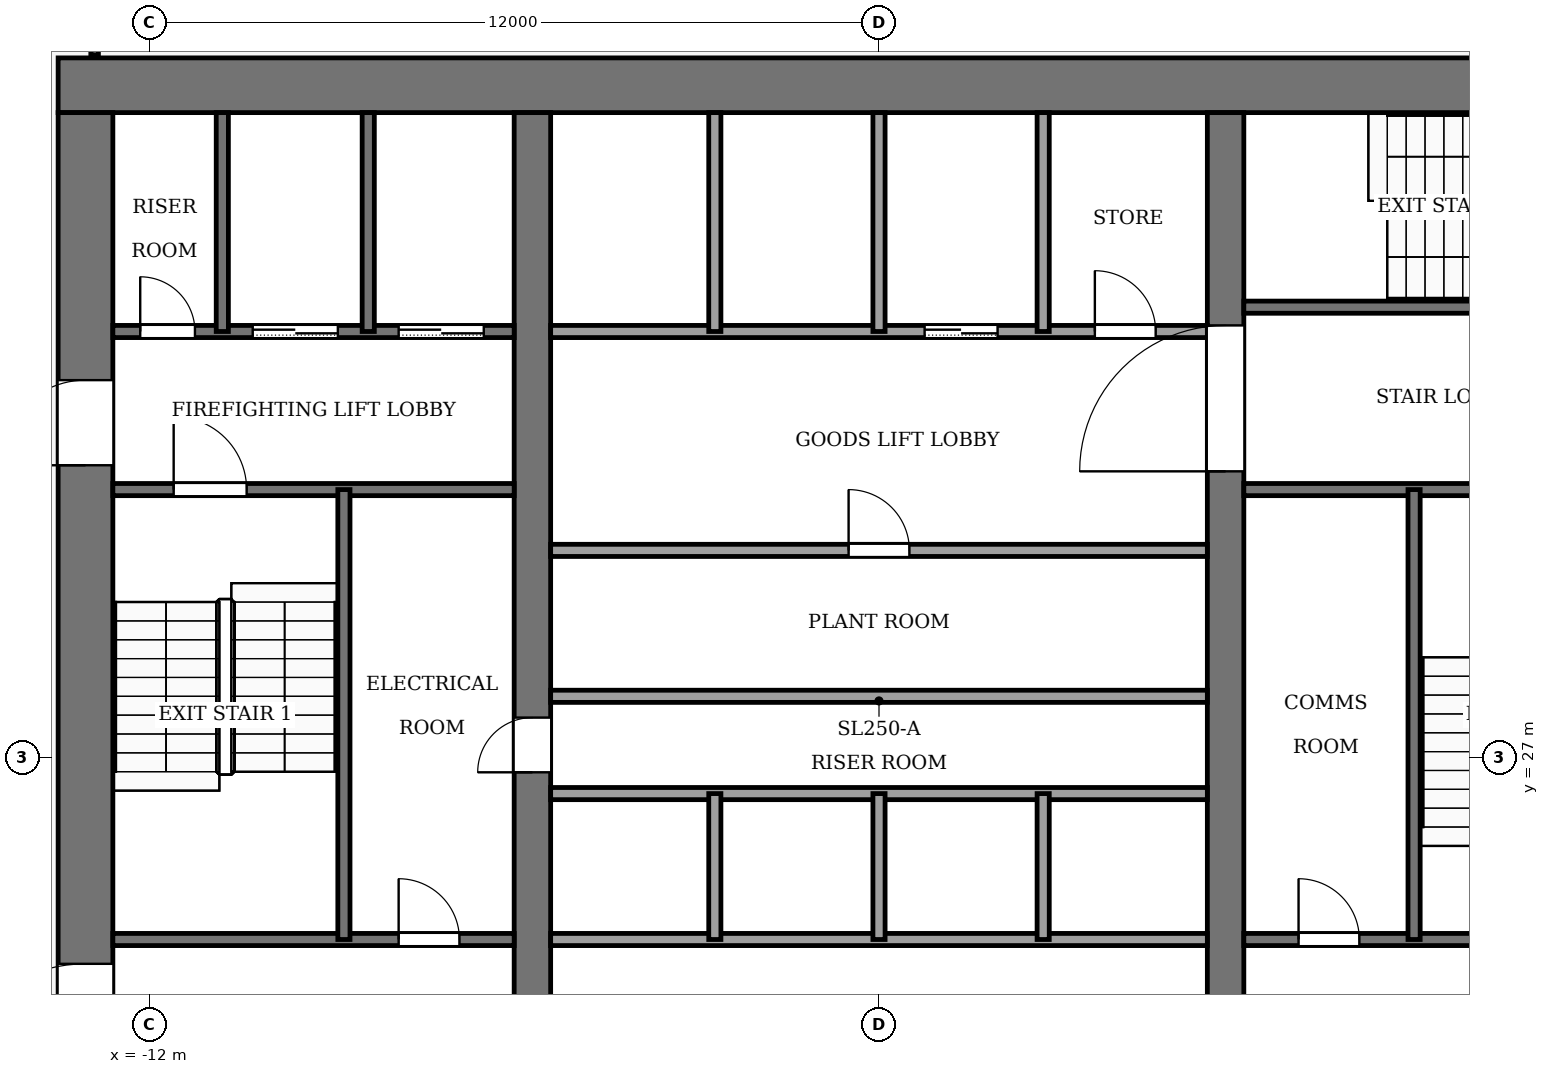
"""IFC4 building model, lengths in metres.
Left out: names, types, materials, properties, quantities, classifications, styles, units other than length and angle.
Written with IfcOpenShell. Run it as: python <this file> out.ifc"""

import sys

from ifc_helpers import new_model, si_unit, direction, frame, frame_2d, origin, place, context, subcontext, project, spatial, rectangle, extrude, element, fill, save


model = new_model("IFC4")
c1 = context("Model", 3, precision=1e-05, world=origin(), true_north=direction((0.0, 1.0)))
c2 = subcontext(c1, "Body", "Model", "MODEL_VIEW")
j1 = project(units=[si_unit("LENGTHUNIT", "METRE"), si_unit("PLANEANGLEUNIT", "RADIAN")], contexts=[c1])
p1 = place(None, origin())
s1 = spatial("IfcSite", under=j1, at=p1, CompositionType="ELEMENT")
p2 = place(p1, origin())
s2 = spatial("IfcBuilding", under=s1, at=p2, CompositionType="ELEMENT")
p3 = place(p2, frame((0.0, 0.0, 226.0)))
s3 = spatial("IfcBuildingStorey", under=s2, at=p3, CompositionType="ELEMENT", Elevation=226.0)
p4 = place(p3, frame((-13.5, 38.05, -0.25), z_axis=(0.0, 0.0, 1.0), x_axis=(1.0, 0.0, 0.0)))
e1 = element("IfcWall", 1, at=p4, inside=s3, PredefinedType="SHEAR", context=c2, shape_type="SweptSolid", body=[
    extrude(rectangle(XDim=27.0, YDim=0.9, at=frame_2d((13.5, 0.0))), origin(), (0.0, 0.0, 1.0), 7.12),
])
p5 = place(p3, frame((-13.05, 18.4, -0.25), z_axis=(0.0, 0.0, 1.0), x_axis=(0.0, 1.0, 0.0)))
e2 = element("IfcWall", 2, at=p5, inside=s3, PredefinedType="SHEAR", context=c2, shape_type="SweptSolid", body=[
    extrude(rectangle(XDim=19.2, YDim=0.9, at=frame_2d((9.6, 0.0))), origin(), (0.0, 0.0, 1.0), 7.12),
])
p6 = place(p5, frame((2.8, 0.0, 0.25)))
e3 = element("IfcOpeningElement", 3, at=p6, cuts=e2, PredefinedType="OPENING", context=c2, shape_type="SweptSolid", body=[
    extrude(rectangle(XDim=2.4, YDim=2.4, at=frame_2d((1.2, 1.2))), frame((0.0, 0.46, 0.0), z_axis=(0.0, -1.0, 0.0), x_axis=(1.0, 0.0, 0.0)), (0.0, 0.0, 1.0), 0.92),
])
p7 = place(p5, frame((13.4, 0.0, 0.25)))
e4 = element("IfcOpeningElement", 4, at=p7, cuts=e2, PredefinedType="OPENING", context=c2, shape_type="SweptSolid", body=[
    extrude(rectangle(XDim=1.4, YDim=2.2, at=frame_2d((0.7, 1.1))), frame((0.0, 0.46, 0.0), z_axis=(0.0, -1.0, 0.0), x_axis=(1.0, 0.0, 0.0)), (0.0, 0.0, 1.0), 0.92),
])
p8 = place(p3, frame((-5.7, 18.4, -0.25), z_axis=(0.0, 0.0, 1.0), x_axis=(0.0, 1.0, 0.0)))
e5 = element("IfcWall", 5, at=p8, inside=s3, PredefinedType="SHEAR", context=c2, shape_type="SweptSolid", body=[
    extrude(rectangle(XDim=19.2, YDim=0.6, at=frame_2d((9.6, 0.0))), origin(), (0.0, 0.0, 1.0), 7.12),
])
p9 = place(p8, frame((8.35, 0.0, 0.25)))
e6 = element("IfcOpeningElement", 6, at=p9, cuts=e5, PredefinedType="OPENING", context=c2, shape_type="SweptSolid", body=[
    extrude(rectangle(XDim=0.9, YDim=2.1, at=frame_2d((0.45, 1.05))), frame((0.0, 0.31, 0.0), z_axis=(0.0, -1.0, 0.0), x_axis=(1.0, 0.0, 0.0)), (0.0, 0.0, 1.0), 0.62),
])
p10 = place(p3, frame((5.7, 18.4, -0.25), z_axis=(0.0, 0.0, 1.0), x_axis=(0.0, 1.0, 0.0)))
e7 = element("IfcWall", 7, at=p10, inside=s3, PredefinedType="SHEAR", context=c2, shape_type="SweptSolid", body=[
    extrude(rectangle(XDim=19.2, YDim=0.6, at=frame_2d((9.6, 0.0))), origin(), (0.0, 0.0, 1.0), 7.12),
])
p11 = place(p10, frame((13.3, 0.0, 0.25)))
e8 = element("IfcOpeningElement", 8, at=p11, cuts=e7, PredefinedType="OPENING", context=c2, shape_type="SweptSolid", body=[
    extrude(rectangle(XDim=2.4, YDim=2.4, at=frame_2d((1.2, 1.2))), frame((0.0, 0.31, 0.0), z_axis=(0.0, -1.0, 0.0), x_axis=(1.0, 0.0, 0.0)), (0.0, 0.0, 1.0), 0.62),
])
p12 = place(p3, frame((-12.6, 24.0, 0.0), z_axis=(0.0, 0.0, 1.0), x_axis=(1.0, 0.0, 0.0)))
e9 = element("IfcWall", 9, at=p12, inside=s3, PredefinedType="PARTITIONING", context=c2, shape_type="SweptSolid", body=[
    extrude(rectangle(XDim=6.6, YDim=0.2, at=frame_2d((3.3, 0.0))), origin(), (0.0, 0.0, 1.0), 6.87),
])
p13 = place(p12, frame((4.7, 0.0, 0.0)))
e10 = element("IfcOpeningElement", 10, at=p13, cuts=e9, PredefinedType="OPENING", context=c2, shape_type="SweptSolid", body=[
    extrude(rectangle(XDim=1.0, YDim=2.1, at=frame_2d((0.5, 1.05))), frame((0.0, 0.11, 0.0), z_axis=(0.0, -1.0, 0.0), x_axis=(1.0, 0.0, 0.0)), (0.0, 0.0, 1.0), 0.22),
])
p14 = place(p3, frame((-5.4, 24.0, 0.0), z_axis=(0.0, 0.0, 1.0), x_axis=(1.0, 0.0, 0.0)))
e11 = element("IfcWall", 11, at=p14, inside=s3, PredefinedType="PARTITIONING", context=c2, shape_type="SweptSolid", body=[
    extrude(rectangle(XDim=10.8, YDim=0.2, at=frame_2d((5.4, 0.0))), origin(), (0.0, 0.0, 1.0), 6.87),
])
p15 = place(p3, frame((6.0, 24.0, 0.0), z_axis=(0.0, 0.0, 1.0), x_axis=(1.0, 0.0, 0.0)))
e12 = element("IfcWall", 12, at=p15, inside=s3, PredefinedType="PARTITIONING", context=c2, shape_type="SweptSolid", body=[
    extrude(rectangle(XDim=6.6, YDim=0.2, at=frame_2d((3.3, 0.0))), origin(), (0.0, 0.0, 1.0), 6.87),
])
p16 = place(p15, frame((0.9, 0.0, 0.0)))
e13 = element("IfcOpeningElement", 13, at=p16, cuts=e12, PredefinedType="OPENING", context=c2, shape_type="SweptSolid", body=[
    extrude(rectangle(XDim=1.0, YDim=2.1, at=frame_2d((0.5, 1.05))), frame((0.0, 0.11, 0.0), z_axis=(0.0, -1.0, 0.0), x_axis=(1.0, 0.0, 0.0)), (0.0, 0.0, 1.0), 0.22),
])
p17 = place(p15, frame((4.4, 0.0, 0.0)))
e14 = element("IfcOpeningElement", 14, at=p17, cuts=e12, PredefinedType="OPENING", context=c2, shape_type="SweptSolid", body=[
    extrude(rectangle(XDim=1.2, YDim=2.2, at=frame_2d((0.6, 1.1))), frame((0.0, 0.11, 0.0), z_axis=(0.0, -1.0, 0.0), x_axis=(1.0, 0.0, 0.0)), (0.0, 0.0, 1.0), 0.22),
])
for number, where, z_axis, x_axis in (
    (15, (-5.4, 26.4, 0.0), (0.0, 0.0, 1.0), (1.0, 0.0, 0.0)),
    (16, (-5.4, 28.0, 0.0), (0.0, 0.0, 1.0), (1.0, 0.0, 0.0)),
):
    element("IfcWall", number, at=place(p3, frame(where, z_axis=z_axis, x_axis=x_axis)), inside=s3, PredefinedType="PARTITIONING", context=c2, shape_type="SweptSolid", body=[
        extrude(rectangle(XDim=10.8, YDim=0.2, at=frame_2d((5.4, 0.0))), origin(), (0.0, 0.0, 1.0), 6.87),
    ])
p18 = place(p3, frame((-5.4, 30.4, 0.0), z_axis=(0.0, 0.0, 1.0), x_axis=(1.0, 0.0, 0.0)))
e17 = element("IfcWall", 17, at=p18, inside=s3, PredefinedType="PARTITIONING", context=c2, shape_type="SweptSolid", body=[
    extrude(rectangle(XDim=10.8, YDim=0.2, at=frame_2d((5.4, 0.0))), origin(), (0.0, 0.0, 1.0), 6.87),
])
p19 = place(p18, frame((4.9, 0.0, 0.0)))
e18 = element("IfcOpeningElement", 18, at=p19, cuts=e17, PredefinedType="OPENING", context=c2, shape_type="SweptSolid", body=[
    extrude(rectangle(XDim=1.0, YDim=2.1, at=frame_2d((0.5, 1.05))), frame((0.0, 0.11, 0.0), z_axis=(0.0, -1.0, 0.0), x_axis=(1.0, 0.0, 0.0)), (0.0, 0.0, 1.0), 0.22),
])
p20 = place(p3, frame((-12.6, 31.4, 0.0), z_axis=(0.0, 0.0, 1.0), x_axis=(1.0, 0.0, 0.0)))
e19 = element("IfcWall", 19, at=p20, inside=s3, PredefinedType="PARTITIONING", context=c2, shape_type="SweptSolid", body=[
    extrude(rectangle(XDim=6.6, YDim=0.2, at=frame_2d((3.3, 0.0))), origin(), (0.0, 0.0, 1.0), 6.87),
])
p21 = place(p20, frame((1.0, 0.0, 0.0)))
e20 = element("IfcOpeningElement", 20, at=p21, cuts=e19, PredefinedType="OPENING", context=c2, shape_type="SweptSolid", body=[
    extrude(rectangle(XDim=1.2, YDim=2.2, at=frame_2d((0.6, 1.1))), frame((0.0, 0.11, 0.0), z_axis=(0.0, -1.0, 0.0), x_axis=(1.0, 0.0, 0.0)), (0.0, 0.0, 1.0), 0.22),
])
p22 = place(p3, frame((6.0, 31.4, 0.0), z_axis=(0.0, 0.0, 1.0), x_axis=(1.0, 0.0, 0.0)))
e21 = element("IfcWall", 21, at=p22, inside=s3, PredefinedType="PARTITIONING", context=c2, shape_type="SweptSolid", body=[
    extrude(rectangle(XDim=6.6, YDim=0.2, at=frame_2d((3.3, 0.0))), origin(), (0.0, 0.0, 1.0), 6.87),
])
p23 = place(p3, frame((-12.6, 34.0, 0.0), z_axis=(0.0, 0.0, 1.0), x_axis=(1.0, 0.0, 0.0)))
e22 = element("IfcWall", 22, at=p23, inside=s3, PredefinedType="PARTITIONING", context=c2, shape_type="SweptSolid", body=[
    extrude(rectangle(XDim=6.6, YDim=0.2, at=frame_2d((3.3, 0.0))), origin(), (0.0, 0.0, 1.0), 6.87),
])
p24 = place(p23, frame((4.7, 0.0, 0.0)))
e23 = element("IfcOpeningElement", 23, at=p24, cuts=e22, PredefinedType="OPENING", context=c2, shape_type="SweptSolid", body=[
    extrude(rectangle(XDim=1.4, YDim=2.2, at=frame_2d((0.7, 1.1))), frame((0.0, 0.11, 0.0), z_axis=(0.0, -1.0, 0.0), x_axis=(1.0, 0.0, 0.0)), (0.0, 0.0, 1.0), 0.22),
])
p25 = place(p23, frame((2.3, 0.0, 0.0)))
e24 = element("IfcOpeningElement", 24, at=p25, cuts=e22, PredefinedType="OPENING", context=c2, shape_type="SweptSolid", body=[
    extrude(rectangle(XDim=1.4, YDim=2.2, at=frame_2d((0.7, 1.1))), frame((0.0, 0.11, 0.0), z_axis=(0.0, -1.0, 0.0), x_axis=(1.0, 0.0, 0.0)), (0.0, 0.0, 1.0), 0.22),
])
p26 = place(p23, frame((0.45, 0.0, 0.0)))
e25 = element("IfcOpeningElement", 25, at=p26, cuts=e22, PredefinedType="OPENING", context=c2, shape_type="SweptSolid", body=[
    extrude(rectangle(XDim=0.9, YDim=2.1, at=frame_2d((0.45, 1.05))), frame((0.0, 0.11, 0.0), z_axis=(0.0, -1.0, 0.0), x_axis=(1.0, 0.0, 0.0)), (0.0, 0.0, 1.0), 0.22),
])
p27 = place(p3, frame((-5.4, 34.0, 0.0), z_axis=(0.0, 0.0, 1.0), x_axis=(1.0, 0.0, 0.0)))
e26 = element("IfcWall", 26, at=p27, inside=s3, PredefinedType="PARTITIONING", context=c2, shape_type="SweptSolid", body=[
    extrude(rectangle(XDim=10.8, YDim=0.2, at=frame_2d((5.4, 0.0))), origin(), (0.0, 0.0, 1.0), 6.87),
])
p28 = place(p27, frame((6.15, 0.0, 0.0)))
e27 = element("IfcOpeningElement", 27, at=p28, cuts=e26, PredefinedType="OPENING", context=c2, shape_type="SweptSolid", body=[
    extrude(rectangle(XDim=1.2, YDim=2.2, at=frame_2d((0.6, 1.1))), frame((0.0, 0.11, 0.0), z_axis=(0.0, -1.0, 0.0), x_axis=(1.0, 0.0, 0.0)), (0.0, 0.0, 1.0), 0.22),
])
p29 = place(p27, frame((8.95, 0.0, 0.0)))
e28 = element("IfcOpeningElement", 28, at=p29, cuts=e26, PredefinedType="OPENING", context=c2, shape_type="SweptSolid", body=[
    extrude(rectangle(XDim=1.0, YDim=2.1, at=frame_2d((0.5, 1.05))), frame((0.0, 0.11, 0.0), z_axis=(0.0, -1.0, 0.0), x_axis=(1.0, 0.0, 0.0)), (0.0, 0.0, 1.0), 0.22),
])
p30 = place(p3, frame((6.0, 34.4, 0.0), z_axis=(0.0, 0.0, 1.0), x_axis=(1.0, 0.0, 0.0)))
e29 = element("IfcWall", 29, at=p30, inside=s3, PredefinedType="PARTITIONING", context=c2, shape_type="SweptSolid", body=[
    extrude(rectangle(XDim=6.6, YDim=0.2, at=frame_2d((3.3, 0.0))), origin(), (0.0, 0.0, 1.0), 6.87),
])
p31 = place(p30, frame((4.8, 0.0, 0.0)))
e30 = element("IfcOpeningElement", 30, at=p31, cuts=e29, PredefinedType="OPENING", context=c2, shape_type="SweptSolid", body=[
    extrude(rectangle(XDim=1.2, YDim=2.2, at=frame_2d((0.6, 1.1))), frame((0.0, 0.11, 0.0), z_axis=(0.0, -1.0, 0.0), x_axis=(1.0, 0.0, 0.0)), (0.0, 0.0, 1.0), 0.22),
])
p32 = place(p3, frame((-10.8, 34.0, 0.0), z_axis=(0.0, 0.0, 1.0), x_axis=(0.0, 1.0, 0.0)))
e31 = element("IfcWall", 31, at=p32, inside=s3, PredefinedType="PARTITIONING", context=c2, shape_type="SweptSolid", body=[
    extrude(rectangle(XDim=3.6, YDim=0.2, at=frame_2d((1.8, 0.0))), origin(), (0.0, 0.0, 1.0), 6.87),
])
p33 = place(p3, frame((-8.8, 24.0, 0.0), z_axis=(0.0, 0.0, 1.0), x_axis=(0.0, 1.0, 0.0)))
e32 = element("IfcWall", 32, at=p33, inside=s3, PredefinedType="PARTITIONING", context=c2, shape_type="SweptSolid", body=[
    extrude(rectangle(XDim=7.4, YDim=0.2, at=frame_2d((3.7, 0.0))), origin(), (0.0, 0.0, 1.0), 6.87),
])
p34 = place(p3, frame((-8.4, 34.0, 0.0), z_axis=(0.0, 0.0, 1.0), x_axis=(0.0, 1.0, 0.0)))
e33 = element("IfcWall", 33, at=p34, inside=s3, PredefinedType="PARTITIONING", context=c2, shape_type="SweptSolid", body=[
    extrude(rectangle(XDim=3.6, YDim=0.2, at=frame_2d((1.8, 0.0))), origin(), (0.0, 0.0, 1.0), 6.87),
])
p35 = place(p3, frame((-2.7, 24.0, 0.0), z_axis=(0.0, 0.0, 1.0), x_axis=(0.0, 1.0, 0.0)))
e34 = element("IfcWall", 34, at=p35, inside=s3, PredefinedType="PARTITIONING", context=c2, shape_type="SweptSolid", body=[
    extrude(rectangle(XDim=2.4, YDim=0.2, at=frame_2d((1.2, 0.0))), origin(), (0.0, 0.0, 1.0), 6.87),
])
p36 = place(p3, frame((-2.7, 34.0, 0.0), z_axis=(0.0, 0.0, 1.0), x_axis=(0.0, 1.0, 0.0)))
e35 = element("IfcWall", 35, at=p36, inside=s3, PredefinedType="PARTITIONING", context=c2, shape_type="SweptSolid", body=[
    extrude(rectangle(XDim=3.6, YDim=0.2, at=frame_2d((1.8, 0.0))), origin(), (0.0, 0.0, 1.0), 6.87),
])
p37 = place(p3, frame((0.0, 24.0, 0.0), z_axis=(0.0, 0.0, 1.0), x_axis=(0.0, 1.0, 0.0)))
e36 = element("IfcWall", 36, at=p37, inside=s3, PredefinedType="PARTITIONING", context=c2, shape_type="SweptSolid", body=[
    extrude(rectangle(XDim=2.4, YDim=0.2, at=frame_2d((1.2, 0.0))), origin(), (0.0, 0.0, 1.0), 6.87),
])
p38 = place(p3, frame((0.0, 34.0, 0.0), z_axis=(0.0, 0.0, 1.0), x_axis=(0.0, 1.0, 0.0)))
e37 = element("IfcWall", 37, at=p38, inside=s3, PredefinedType="PARTITIONING", context=c2, shape_type="SweptSolid", body=[
    extrude(rectangle(XDim=3.6, YDim=0.2, at=frame_2d((1.8, 0.0))), origin(), (0.0, 0.0, 1.0), 6.87),
])
p39 = place(p3, frame((2.7, 24.0, 0.0), z_axis=(0.0, 0.0, 1.0), x_axis=(0.0, 1.0, 0.0)))
e38 = element("IfcWall", 38, at=p39, inside=s3, PredefinedType="PARTITIONING", context=c2, shape_type="SweptSolid", body=[
    extrude(rectangle(XDim=2.4, YDim=0.2, at=frame_2d((1.2, 0.0))), origin(), (0.0, 0.0, 1.0), 6.87),
])
p40 = place(p3, frame((2.7, 34.0, 0.0), z_axis=(0.0, 0.0, 1.0), x_axis=(0.0, 1.0, 0.0)))
e39 = element("IfcWall", 39, at=p40, inside=s3, PredefinedType="PARTITIONING", context=c2, shape_type="SweptSolid", body=[
    extrude(rectangle(XDim=3.6, YDim=0.2, at=frame_2d((1.8, 0.0))), origin(), (0.0, 0.0, 1.0), 6.87),
])
p41 = place(p3, frame((8.8, 24.0, 0.0), z_axis=(0.0, 0.0, 1.0), x_axis=(0.0, 1.0, 0.0)))
e40 = element("IfcWall", 40, at=p41, inside=s3, PredefinedType="PARTITIONING", context=c2, shape_type="SweptSolid", body=[
    extrude(rectangle(XDim=7.4, YDim=0.2, at=frame_2d((3.7, 0.0))), origin(), (0.0, 0.0, 1.0), 6.87),
])
p42 = place(p3, frame((-12.9, 66.908, 0.0), z_axis=(0.0, 0.0, 1.0), x_axis=(0.0, -1.0, 0.0)))
e41 = element("IfcWall", 41, at=p42, inside=s3, PredefinedType="PARTITIONING", context=c2, shape_type="SweptSolid", body=[
    extrude(rectangle(XDim=28.358, YDim=0.125, at=frame_2d((14.179, 0.0))), origin(), (0.0, 0.0, 1.0), 6.24),
])
p43 = place(p28, origin())
e42 = element("IfcDoor", 42, at=p43, inside=s3, OperationType="SLIDING_TO_LEFT", PredefinedType="DOOR", context=c2, shape_type="SweptSolid", body=[
    extrude(rectangle(XDim=1.2, YDim=2.2, at=frame_2d((0.6, 1.1))), frame((0.0, 0.025, 0.0), z_axis=(0.0, -1.0, 0.0), x_axis=(1.0, 0.0, 0.0)), (0.0, 0.0, 1.0), 0.05),
])
fill(e27, e42)
p44 = place(p24, origin())
e43 = element("IfcDoor", 43, at=p44, inside=s3, OperationType="SLIDING_TO_LEFT", PredefinedType="DOOR", context=c2, shape_type="SweptSolid", body=[
    extrude(rectangle(XDim=1.4, YDim=2.2, at=frame_2d((0.7, 1.1))), frame((0.0, 0.025, 0.0), z_axis=(0.0, -1.0, 0.0), x_axis=(1.0, 0.0, 0.0)), (0.0, 0.0, 1.0), 0.05),
])
fill(e23, e43)
p45 = place(p25, origin())
e44 = element("IfcDoor", 44, at=p45, inside=s3, OperationType="SLIDING_TO_LEFT", PredefinedType="DOOR", context=c2, shape_type="SweptSolid", body=[
    extrude(rectangle(XDim=1.4, YDim=2.2, at=frame_2d((0.7, 1.1))), frame((0.0, 0.025, 0.0), z_axis=(0.0, -1.0, 0.0), x_axis=(1.0, 0.0, 0.0)), (0.0, 0.0, 1.0), 0.05),
])
fill(e24, e44)
p46 = place(p26, origin())
e45 = element("IfcDoor", 45, at=p46, inside=s3, OperationType="SINGLE_SWING_RIGHT", PredefinedType="DOOR", context=c2, shape_type="SweptSolid", body=[
    extrude(rectangle(XDim=0.9, YDim=2.1, at=frame_2d((0.45, 1.05))), frame((0.0, 0.025, 0.0), z_axis=(0.0, -1.0, 0.0), x_axis=(1.0, 0.0, 0.0)), (0.0, 0.0, 1.0), 0.05),
])
fill(e25, e45)
p47 = place(p19, origin())
e46 = element("IfcDoor", 46, at=p47, inside=s3, OperationType="SINGLE_SWING_RIGHT", PredefinedType="DOOR", context=c2, shape_type="SweptSolid", body=[
    extrude(rectangle(XDim=1.0, YDim=2.1, at=frame_2d((0.5, 1.05))), frame((0.0, 0.025, 0.0), z_axis=(0.0, -1.0, 0.0), x_axis=(1.0, 0.0, 0.0)), (0.0, 0.0, 1.0), 0.05),
])
fill(e18, e46)
p48 = place(p13, origin())
e47 = element("IfcDoor", 47, at=p48, inside=s3, OperationType="SINGLE_SWING_LEFT", PredefinedType="DOOR", context=c2, shape_type="SweptSolid", body=[
    extrude(rectangle(XDim=1.0, YDim=2.1, at=frame_2d((0.5, 1.05))), frame((0.0, 0.025, 0.0), z_axis=(0.0, -1.0, 0.0), x_axis=(1.0, 0.0, 0.0)), (0.0, 0.0, 1.0), 0.05),
])
fill(e10, e47)
p49 = place(p16, origin())
e48 = element("IfcDoor", 48, at=p49, inside=s3, OperationType="SINGLE_SWING_RIGHT", PredefinedType="DOOR", context=c2, shape_type="SweptSolid", body=[
    extrude(rectangle(XDim=1.0, YDim=2.1, at=frame_2d((0.5, 1.05))), frame((0.0, 0.025, 0.0), z_axis=(0.0, -1.0, 0.0), x_axis=(1.0, 0.0, 0.0)), (0.0, 0.0, 1.0), 0.05),
])
fill(e13, e48)
p50 = place(p29, origin())
e49 = element("IfcDoor", 49, at=p50, inside=s3, OperationType="SINGLE_SWING_LEFT", PredefinedType="DOOR", context=c2, shape_type="SweptSolid", body=[
    extrude(rectangle(XDim=1.0, YDim=2.1, at=frame_2d((0.5, 1.05))), frame((0.0, 0.025, 0.0), z_axis=(0.0, -1.0, 0.0), x_axis=(1.0, 0.0, 0.0)), (0.0, 0.0, 1.0), 0.05),
])
fill(e28, e49)
p51 = place(p9, origin())
e50 = element("IfcDoor", 50, at=p51, inside=s3, OperationType="SINGLE_SWING_LEFT", PredefinedType="DOOR", context=c2, shape_type="SweptSolid", body=[
    extrude(rectangle(XDim=0.9, YDim=2.1, at=frame_2d((0.45, 1.05))), frame((0.0, 0.025, 0.0), z_axis=(0.0, -1.0, 0.0), x_axis=(1.0, 0.0, 0.0)), (0.0, 0.0, 1.0), 0.05),
])
fill(e6, e50)
p52 = place(p21, origin())
e51 = element("IfcDoor", 51, at=p52, inside=s3, OperationType="SINGLE_SWING_LEFT", PredefinedType="DOOR", context=c2, shape_type="SweptSolid", body=[
    extrude(rectangle(XDim=1.2, YDim=2.2, at=frame_2d((0.6, 1.1))), frame((0.0, 0.025, 0.0), z_axis=(0.0, -1.0, 0.0), x_axis=(1.0, 0.0, 0.0)), (0.0, 0.0, 1.0), 0.05),
])
fill(e20, e51)
p53 = place(p11, origin())
e52 = element("IfcDoor", 52, at=p53, inside=s3, OperationType="DOUBLE_DOOR_SINGLE_SWING", PredefinedType="DOOR", context=c2, shape_type="SweptSolid", body=[
    extrude(rectangle(XDim=2.4, YDim=2.4, at=frame_2d((1.2, 1.2))), frame((0.0, 0.025, 0.0), z_axis=(0.0, -1.0, 0.0), x_axis=(1.0, 0.0, 0.0)), (0.0, 0.0, 1.0), 0.05),
])
fill(e8, e52)
p54 = place(p6, origin())
e53 = element("IfcDoor", 53, at=p54, inside=s3, OperationType="DOUBLE_DOOR_SINGLE_SWING", PredefinedType="DOOR", context=c2, shape_type="SweptSolid", body=[
    extrude(rectangle(XDim=2.4, YDim=2.4, at=frame_2d((1.2, 1.2))), frame((0.0, 0.025, 0.0), z_axis=(0.0, -1.0, 0.0), x_axis=(1.0, 0.0, 0.0)), (0.0, 0.0, 1.0), 0.05),
])
fill(e3, e53)
p55 = place(p7, origin())
e54 = element("IfcDoor", 54, at=p55, inside=s3, OperationType="SINGLE_SWING_LEFT", PredefinedType="DOOR", context=c2, shape_type="SweptSolid", body=[
    extrude(rectangle(XDim=1.4, YDim=2.2, at=frame_2d((0.7, 1.1))), frame((0.0, 0.025, 0.0), z_axis=(0.0, -1.0, 0.0), x_axis=(1.0, 0.0, 0.0)), (0.0, 0.0, 1.0), 0.05),
])
fill(e4, e54)
save(model, sys.argv[1])
